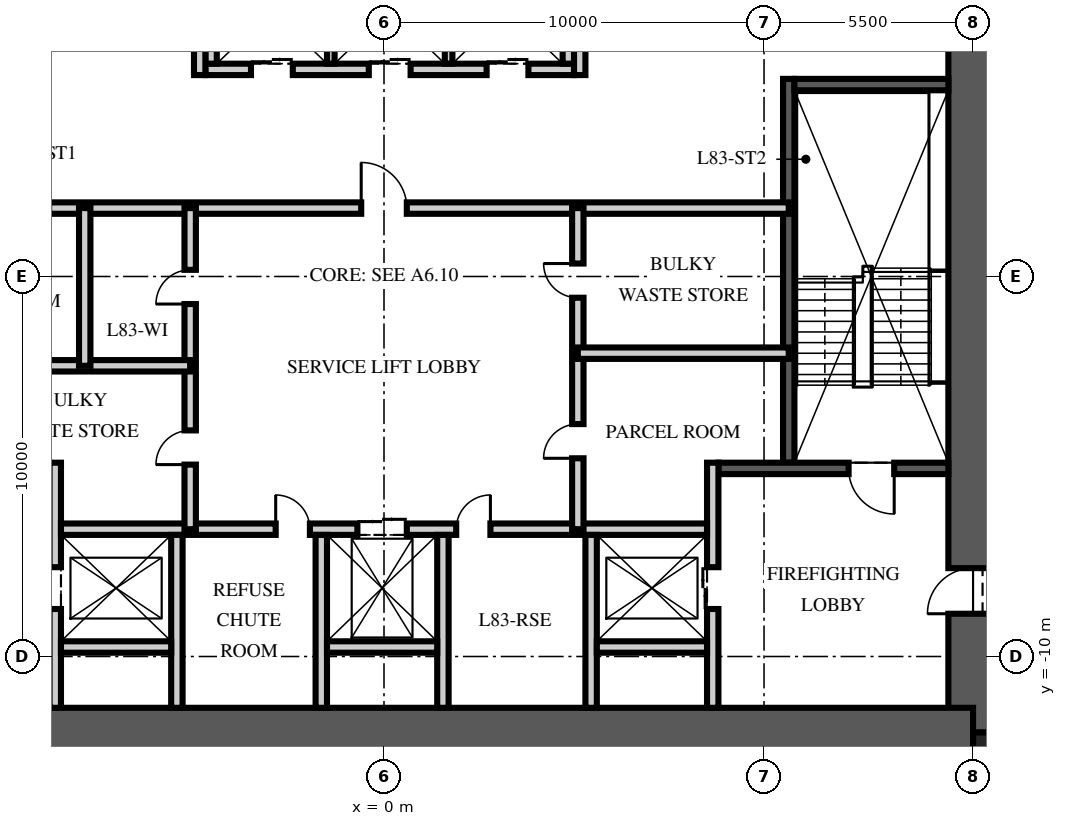
"""IFC4 building model, lengths in metres.
Left out: names, types, materials, properties, quantities, classifications, styles, units other than length and angle.
Written with IfcOpenShell. Run it as: python <this file> out.ifc"""

import sys

from ifc_helpers import new_model, si_unit, direction, frame, frame_2d, origin, origin_2d, place, context, subcontext, project, spatial, rectangle, extrude, element, fill, save


model = new_model("IFC4")
c1 = context("Model", 3, precision=1e-05, world=origin(), true_north=direction((0.0, 1.0)))
c2 = subcontext(c1, "Body", "Model", "MODEL_VIEW")
j1 = project(units=[si_unit("LENGTHUNIT", "METRE"), si_unit("PLANEANGLEUNIT", "RADIAN")], contexts=[c1])
p1 = place(None, origin())
s1 = spatial("IfcSite", under=j1, at=p1, CompositionType="ELEMENT")
p2 = place(p1, origin())
s2 = spatial("IfcBuilding", under=s1, at=p2, CompositionType="ELEMENT")
p3 = place(p2, frame((0.0, 0.0, 330.75)))
s3 = spatial("IfcBuildingStorey", under=s2, at=p3, CompositionType="ELEMENT", Elevation=330.75)
p4 = place(p3, frame((15.5, -12.0, -0.25), z_axis=(0.0, 0.0, 1.0), x_axis=(0.0, 1.0, 0.0)))
e1 = element("IfcWall", 1, at=p4, inside=s3, PredefinedType="SHEAR", context=c2, shape_type="SweptSolid", body=[
    extrude(rectangle(XDim=24.0, YDim=1.3, at=frame_2d((12.0, 0.0))), origin(), (0.0, 0.0, 1.0), 3.75),
])
p5 = place(p4, frame((3.125, 0.0, 0.25)))
e2 = element("IfcOpeningElement", 2, at=p5, cuts=e1, PredefinedType="OPENING", context=c2, shape_type="SweptSolid", body=[
    extrude(rectangle(XDim=1.2, YDim=2.1, at=frame_2d((0.6, 1.05))), frame((0.0, 0.66, 0.0), z_axis=(0.0, -1.0, 0.0), x_axis=(1.0, 0.0, 0.0)), (0.0, 0.0, 1.0), 1.32),
])
p6 = place(p4, frame((19.375, 0.0, 0.25)))
e3 = element("IfcOpeningElement", 3, at=p6, cuts=e1, PredefinedType="OPENING", context=c2, shape_type="SweptSolid", body=[
    extrude(rectangle(XDim=1.8, YDim=2.1, at=frame_2d((0.9, 1.05))), frame((0.0, 0.66, 0.0), z_axis=(0.0, -1.0, 0.0), x_axis=(1.0, 0.0, 0.0)), (0.0, 0.0, 1.0), 1.32),
])
p7 = place(p3, frame((-15.5, -12.0, -0.25), z_axis=(0.0, 0.0, 1.0), x_axis=(1.0, 0.0, 0.0)))
e4 = element("IfcWall", 4, at=p7, inside=s3, PredefinedType="SHEAR", context=c2, shape_type="SweptSolid", body=[
    extrude(rectangle(XDim=31.0, YDim=1.3, at=frame_2d((15.5, 0.0))), origin(), (0.0, 0.0, 1.0), 3.75),
])
p8 = place(p3, frame((15.825, -12.325, -0.25), z_axis=(0.0, 0.0, 1.0), x_axis=(1.0, 0.0, 0.0)))
e5 = element("IfcColumn", 5, at=p8, inside=s3, PredefinedType="COLUMN", context=c2, shape_type="SweptSolid", body=[
    extrude(rectangle(XDim=0.65, YDim=0.65, at=origin_2d()), origin(), (0.0, 0.0, 1.0), 3.75),
])
p9 = place(p3, frame((-8.65, -11.35, 0.0), z_axis=(0.0, 0.0, 1.0), x_axis=(0.0, 1.0, 0.0)))
e6 = element("IfcWall", 6, at=p9, inside=s3, PredefinedType="PARTITIONING", context=c2, shape_type="SweptSolid", body=[
    extrude(rectangle(XDim=6.45, YDim=0.3, at=frame_2d((3.225, 0.0))), origin(), (0.0, 0.0, 1.0), 3.5),
])
p10 = place(p9, frame((2.6, 0.0, 0.0)))
e7 = element("IfcOpeningElement", 7, at=p10, cuts=e6, PredefinedType="OPENING", context=c2, shape_type="SweptSolid", body=[
    extrude(rectangle(XDim=1.1, YDim=2.1, at=frame_2d((0.55, 1.05))), frame((0.0, 0.16, 0.0), z_axis=(0.0, -1.0, 0.0), x_axis=(1.0, 0.0, 0.0)), (0.0, 0.0, 1.0), 0.32),
])
p11 = place(p3, frame((10.65, -4.9, 0.0), z_axis=(0.0, 0.0, 1.0), x_axis=(0.0, 1.0, 0.0)))
e8 = element("IfcWall", 8, at=p11, inside=s3, PredefinedType="SOLIDWALL", context=c2, shape_type="SweptSolid", body=[
    extrude(rectangle(XDim=10.1, YDim=0.3, at=frame_2d((5.05, 0.0))), origin(), (0.0, 0.0, 1.0), 3.5),
])
p12 = place(p3, frame((14.85, -5.05, 0.0), z_axis=(0.0, 0.0, 1.0), x_axis=(-1.0, 0.0, 0.0)))
e9 = element("IfcWall", 9, at=p12, inside=s3, PredefinedType="SOLIDWALL", context=c2, shape_type="SweptSolid", body=[
    extrude(rectangle(XDim=6.05, YDim=0.3, at=frame_2d((3.025, 0.0))), origin(), (0.0, 0.0, 1.0), 3.5),
])
p13 = place(p12, frame((1.425, 0.0, 0.0)))
e10 = element("IfcOpeningElement", 10, at=p13, cuts=e9, PredefinedType="OPENING", context=c2, shape_type="SweptSolid", body=[
    extrude(rectangle(XDim=1.2, YDim=2.1, at=frame_2d((0.6, 1.05))), frame((0.0, 0.16, 0.0), z_axis=(0.0, -1.0, 0.0), x_axis=(1.0, 0.0, 0.0)), (0.0, 0.0, 1.0), 0.32),
])
p14 = place(p3, frame((14.85, 5.05, 0.0), z_axis=(0.0, 0.0, 1.0), x_axis=(-1.0, 0.0, 0.0)))
e11 = element("IfcWall", 11, at=p14, inside=s3, PredefinedType="SOLIDWALL", context=c2, shape_type="SweptSolid", body=[
    extrude(rectangle(XDim=4.05, YDim=0.3, at=frame_2d((2.025, 0.0))), origin(), (0.0, 0.0, 1.0), 3.5),
])
p15 = place(p3, frame((8.65, -11.35, 0.0), z_axis=(0.0, 0.0, 1.0), x_axis=(0.0, 1.0, 0.0)))
e12 = element("IfcWall", 12, at=p15, inside=s3, PredefinedType="PARTITIONING", context=c2, shape_type="SweptSolid", body=[
    extrude(rectangle(XDim=6.45, YDim=0.3, at=frame_2d((3.225, 0.0))), origin(), (0.0, 0.0, 1.0), 3.5),
])
p16 = place(p15, frame((2.6, 0.0, 0.0)))
e13 = element("IfcOpeningElement", 13, at=p16, cuts=e12, PredefinedType="OPENING", context=c2, shape_type="SweptSolid", body=[
    extrude(rectangle(XDim=1.1, YDim=2.1, at=frame_2d((0.55, 1.05))), frame((0.0, 0.16, 0.0), z_axis=(0.0, -1.0, 0.0), x_axis=(1.0, 0.0, 0.0)), (0.0, 0.0, 1.0), 0.32),
])
p17 = place(p3, frame((-8.5, -6.65, 0.0), z_axis=(0.0, 0.0, 1.0), x_axis=(1.0, 0.0, 0.0)))
e14 = element("IfcWall", 14, at=p17, inside=s3, PredefinedType="PARTITIONING", context=c2, shape_type="SweptSolid", body=[
    extrude(rectangle(XDim=17.0, YDim=0.3, at=frame_2d((8.5, 0.0))), origin(), (0.0, 0.0, 1.0), 3.5),
])
p18 = place(p17, frame((7.8, 0.0, 0.0)))
e15 = element("IfcOpeningElement", 15, at=p18, cuts=e14, PredefinedType="OPENING", context=c2, shape_type="SweptSolid", body=[
    extrude(rectangle(XDim=1.3, YDim=2.4, at=frame_2d((0.65, 1.2))), frame((0.0, 0.16, 0.0), z_axis=(0.0, -1.0, 0.0), x_axis=(1.0, 0.0, 0.0)), (0.0, 0.0, 1.0), 0.32),
])
p19 = place(p17, frame((5.65, 0.0, 0.0)))
e16 = element("IfcOpeningElement", 16, at=p19, cuts=e14, PredefinedType="OPENING", context=c2, shape_type="SweptSolid", body=[
    extrude(rectangle(XDim=0.9, YDim=2.1, at=frame_2d((0.45, 1.05))), frame((0.0, 0.16, 0.0), z_axis=(0.0, -1.0, 0.0), x_axis=(1.0, 0.0, 0.0)), (0.0, 0.0, 1.0), 0.32),
])
p20 = place(p17, frame((10.4, 0.0, 0.0)))
e17 = element("IfcOpeningElement", 17, at=p20, cuts=e14, PredefinedType="OPENING", context=c2, shape_type="SweptSolid", body=[
    extrude(rectangle(XDim=0.9, YDim=2.1, at=frame_2d((0.45, 1.05))), frame((0.0, 0.16, 0.0), z_axis=(0.0, -1.0, 0.0), x_axis=(1.0, 0.0, 0.0)), (0.0, 0.0, 1.0), 0.32),
])
for number, where, z_axis, x_axis in (
    (18, (-5.45, -11.35, 0.0), (0.0, 0.0, 1.0), (0.0, 1.0, 0.0)),
    (19, (-1.65, -11.35, 0.0), (0.0, 0.0, 1.0), (0.0, 1.0, 0.0)),
    (20, (1.55, -11.35, 0.0), (0.0, 0.0, 1.0), (0.0, 1.0, 0.0)),
    (21, (5.45, -11.35, 0.0), (0.0, 0.0, 1.0), (0.0, 1.0, 0.0)),
):
    element("IfcWall", number, at=place(p3, frame(where, z_axis=z_axis, x_axis=x_axis)), inside=s3, PredefinedType="PARTITIONING", context=c2, shape_type="SweptSolid", body=[
        extrude(rectangle(XDim=4.55, YDim=0.3, at=frame_2d((2.275, 0.0))), origin(), (0.0, 0.0, 1.0), 3.5),
    ])
for number, where, z_axis, x_axis in (
    (22, (-8.5, -9.75, 0.0), (0.0, 0.0, 1.0), (1.0, 0.0, 0.0)),
    (23, (-1.5, -9.75, 0.0), (0.0, 0.0, 1.0), (1.0, 0.0, 0.0)),
    (24, (5.6, -9.75, 0.0), (0.0, 0.0, 1.0), (1.0, 0.0, 0.0)),
):
    element("IfcWall", number, at=place(p3, frame(where, z_axis=z_axis, x_axis=x_axis)), inside=s3, PredefinedType="PARTITIONING", context=c2, shape_type="SweptSolid", body=[
        extrude(rectangle(XDim=2.9, YDim=0.3, at=frame_2d((1.45, 0.0))), origin(), (0.0, 0.0, 1.0), 3.5),
    ])
p21 = place(p3, frame((-4.7, 5.45, 0.0), z_axis=(0.0, 0.0, 1.0), x_axis=(1.0, 0.0, 0.0)))
e25 = element("IfcWall", 25, at=p21, inside=s3, PredefinedType="PARTITIONING", context=c2, shape_type="SweptSolid", body=[
    extrude(rectangle(XDim=9.7, YDim=0.3, at=frame_2d((4.85, 0.0))), origin(), (0.0, 0.0, 1.0), 3.5),
])
p22 = place(p21, frame((1.2, 0.0, 0.0)))
e26 = element("IfcOpeningElement", 26, at=p22, cuts=e25, PredefinedType="OPENING", context=c2, shape_type="SweptSolid", body=[
    extrude(rectangle(XDim=1.1, YDim=2.1, at=frame_2d((0.55, 1.05))), frame((0.0, 0.16, 0.0), z_axis=(0.0, -1.0, 0.0), x_axis=(1.0, 0.0, 0.0)), (0.0, 0.0, 1.0), 0.32),
])
p23 = place(p21, frame((4.3, 0.0, 0.0)))
e27 = element("IfcOpeningElement", 27, at=p23, cuts=e25, PredefinedType="OPENING", context=c2, shape_type="SweptSolid", body=[
    extrude(rectangle(XDim=1.1, YDim=2.1, at=frame_2d((0.55, 1.05))), frame((0.0, 0.16, 0.0), z_axis=(0.0, -1.0, 0.0), x_axis=(1.0, 0.0, 0.0)), (0.0, 0.0, 1.0), 0.32),
])
p24 = place(p21, frame((7.4, 0.0, 0.0)))
e28 = element("IfcOpeningElement", 28, at=p24, cuts=e25, PredefinedType="OPENING", context=c2, shape_type="SweptSolid", body=[
    extrude(rectangle(XDim=1.1, YDim=2.1, at=frame_2d((0.55, 1.05))), frame((0.0, 0.16, 0.0), z_axis=(0.0, -1.0, 0.0), x_axis=(1.0, 0.0, 0.0)), (0.0, 0.0, 1.0), 0.32),
])
for number, where, z_axis, x_axis in (
    (29, (-4.55, 5.6, 0.0), (0.0, 0.0, 1.0), (0.0, 1.0, 0.0)),
    (30, (4.85, 5.6, 0.0), (0.0, 0.0, 1.0), (0.0, 1.0, 0.0)),
):
    element("IfcWall", number, at=place(p3, frame(where, z_axis=z_axis, x_axis=x_axis)), inside=s3, PredefinedType="PARTITIONING", context=c2, shape_type="SweptSolid", body=[
        extrude(rectangle(XDim=2.8, YDim=0.3, at=frame_2d((1.4, 0.0))), origin(), (0.0, 0.0, 1.0), 3.5),
    ])
for number, where, z_axis, x_axis in (
    (31, (-1.4, 5.6, 0.0), (0.0, 0.0, 1.0), (0.0, 1.0, 0.0)),
    (32, (1.7, 5.6, 0.0), (0.0, 0.0, 1.0), (0.0, 1.0, 0.0)),
):
    element("IfcWall", number, at=place(p3, frame(where, z_axis=z_axis, x_axis=x_axis)), inside=s3, PredefinedType="PARTITIONING", context=c2, shape_type="SweptSolid", body=[
        extrude(rectangle(XDim=2.8, YDim=0.2, at=frame_2d((1.4, 0.0))), origin(), (0.0, 0.0, 1.0), 3.5),
    ])
p25 = place(p3, frame((-10.65, 1.8, 0.0), z_axis=(0.0, 0.0, 1.0), x_axis=(1.0, 0.0, 0.0)))
e33 = element("IfcWall", 33, at=p25, inside=s3, PredefinedType="PARTITIONING", context=c2, shape_type="SweptSolid", body=[
    extrude(rectangle(XDim=21.3, YDim=0.3, at=frame_2d((10.65, 0.0))), origin(), (0.0, 0.0, 1.0), 3.5),
])
p26 = place(p25, frame((10.05, 0.0, 0.0)))
e34 = element("IfcOpeningElement", 34, at=p26, cuts=e33, PredefinedType="OPENING", context=c2, shape_type="SweptSolid", body=[
    extrude(rectangle(XDim=1.2, YDim=2.1, at=frame_2d((0.6, 1.05))), frame((0.0, 0.16, 0.0), z_axis=(0.0, -1.0, 0.0), x_axis=(1.0, 0.0, 0.0)), (0.0, 0.0, 1.0), 0.32),
])
p27 = place(p25, frame((0.938, 0.0, 0.0)))
e35 = element("IfcOpeningElement", 35, at=p27, cuts=e33, PredefinedType="OPENING", context=c2, shape_type="SweptSolid", body=[
    extrude(rectangle(XDim=0.9, YDim=2.1, at=frame_2d((0.45, 1.05))), frame((0.0, 0.16, 0.0), z_axis=(0.0, -1.0, 0.0), x_axis=(1.0, 0.0, 0.0)), (0.0, 0.0, 1.0), 0.32),
])
p28 = place(p3, frame((-5.1, -6.65, 0.0), z_axis=(0.0, 0.0, 1.0), x_axis=(0.0, 1.0, 0.0)))
e36 = element("IfcWall", 36, at=p28, inside=s3, PredefinedType="PARTITIONING", context=c2, shape_type="SweptSolid", body=[
    extrude(rectangle(XDim=8.45, YDim=0.3, at=frame_2d((4.225, 0.0))), origin(), (0.0, 0.0, 1.0), 3.5),
])
p29 = place(p28, frame((1.7, 0.0, 0.0)))
e37 = element("IfcOpeningElement", 37, at=p29, cuts=e36, PredefinedType="OPENING", context=c2, shape_type="SweptSolid", body=[
    extrude(rectangle(XDim=0.9, YDim=2.1, at=frame_2d((0.45, 1.05))), frame((0.0, 0.16, 0.0), z_axis=(0.0, -1.0, 0.0), x_axis=(1.0, 0.0, 0.0)), (0.0, 0.0, 1.0), 0.32),
])
p30 = place(p28, frame((5.925, 0.0, 0.0)))
e38 = element("IfcOpeningElement", 38, at=p30, cuts=e36, PredefinedType="OPENING", context=c2, shape_type="SweptSolid", body=[
    extrude(rectangle(XDim=0.9, YDim=2.1, at=frame_2d((0.45, 1.05))), frame((0.0, 0.16, 0.0), z_axis=(0.0, -1.0, 0.0), x_axis=(1.0, 0.0, 0.0)), (0.0, 0.0, 1.0), 0.32),
])
p31 = place(p3, frame((5.1, -6.65, 0.0), z_axis=(0.0, 0.0, 1.0), x_axis=(0.0, 1.0, 0.0)))
e39 = element("IfcWall", 39, at=p31, inside=s3, PredefinedType="PARTITIONING", context=c2, shape_type="SweptSolid", body=[
    extrude(rectangle(XDim=8.45, YDim=0.3, at=frame_2d((4.225, 0.0))), origin(), (0.0, 0.0, 1.0), 3.5),
])
p32 = place(p31, frame((1.866, 0.0, 0.0)))
e40 = element("IfcOpeningElement", 40, at=p32, cuts=e39, PredefinedType="OPENING", context=c2, shape_type="SweptSolid", body=[
    extrude(rectangle(XDim=0.9, YDim=2.1, at=frame_2d((0.45, 1.05))), frame((0.0, 0.16, 0.0), z_axis=(0.0, -1.0, 0.0), x_axis=(1.0, 0.0, 0.0)), (0.0, 0.0, 1.0), 0.32),
])
p33 = place(p31, frame((6.091, 0.0, 0.0)))
e41 = element("IfcOpeningElement", 41, at=p33, cuts=e39, PredefinedType="OPENING", context=c2, shape_type="SweptSolid", body=[
    extrude(rectangle(XDim=0.9, YDim=2.1, at=frame_2d((0.45, 1.05))), frame((0.0, 0.16, 0.0), z_axis=(0.0, -1.0, 0.0), x_axis=(1.0, 0.0, 0.0)), (0.0, 0.0, 1.0), 0.32),
])
p34 = place(p3, frame((-10.65, -2.35, 0.0), z_axis=(0.0, 0.0, 1.0), x_axis=(1.0, 0.0, 0.0)))
e42 = element("IfcWall", 42, at=p34, inside=s3, PredefinedType="PARTITIONING", context=c2, shape_type="SweptSolid", body=[
    extrude(rectangle(XDim=5.55, YDim=0.3, at=frame_2d((2.775, 0.0))), origin(), (0.0, 0.0, 1.0), 3.5),
])
p35 = place(p3, frame((-7.875, -2.35, 0.0), z_axis=(0.0, 0.0, 1.0), x_axis=(0.0, 1.0, 0.0)))
e43 = element("IfcWall", 43, at=p35, inside=s3, PredefinedType="PARTITIONING", context=c2, shape_type="SweptSolid", body=[
    extrude(rectangle(XDim=4.15, YDim=0.3, at=frame_2d((2.075, 0.0))), origin(), (0.0, 0.0, 1.0), 3.5),
])
p36 = place(p3, frame((10.65, -2.018, 0.0), z_axis=(0.0, 0.0, 1.0), x_axis=(-1.0, 0.0, 0.0)))
e44 = element("IfcWall", 44, at=p36, inside=s3, PredefinedType="PARTITIONING", context=c2, shape_type="SweptSolid", body=[
    extrude(rectangle(XDim=5.55, YDim=0.3, at=frame_2d((2.775, 0.0))), origin(), (0.0, 0.0, 1.0), 3.5),
])
p37 = place(p3, frame((-4.85, 5.3, 0.0), z_axis=(0.0, 0.0, 1.0), x_axis=(0.0, 1.0, 0.0)))
e45 = element("IfcWall", 45, at=p37, inside=s3, PredefinedType="PARTITIONING", context=c2, shape_type="SweptSolid", body=[
    extrude(rectangle(XDim=6.05, YDim=0.3, at=frame_2d((3.025, 0.0))), origin(), (0.0, 0.0, 1.0), 3.5),
])
p38 = place(p3, frame((5.15, 5.3, 0.0), z_axis=(0.0, 0.0, 1.0), x_axis=(0.0, 1.0, 0.0)))
e46 = element("IfcWall", 46, at=p38, inside=s3, PredefinedType="PARTITIONING", context=c2, shape_type="SweptSolid", body=[
    extrude(rectangle(XDim=6.05, YDim=0.3, at=frame_2d((3.025, 0.0))), origin(), (0.0, 0.0, 1.0), 3.5),
])
p39 = place(p38, frame((4.225, 0.0, 0.0)))
e47 = element("IfcOpeningElement", 47, at=p39, cuts=e46, PredefinedType="OPENING", context=c2, shape_type="SweptSolid", body=[
    extrude(rectangle(XDim=0.9, YDim=2.1, at=frame_2d((0.45, 1.05))), frame((0.0, 0.16, 0.0), z_axis=(0.0, -1.0, 0.0), x_axis=(1.0, 0.0, 0.0)), (0.0, 0.0, 1.0), 0.32),
])
p40 = place(p13, origin())
e48 = element("IfcDoor", 48, at=p40, inside=s3, OperationType="SINGLE_SWING_LEFT", PredefinedType="DOOR", context=c2, shape_type="SweptSolid", body=[
    extrude(rectangle(XDim=1.2, YDim=2.1, at=frame_2d((0.6, 1.05))), frame((0.0, 0.025, 0.0), z_axis=(0.0, -1.0, 0.0), x_axis=(1.0, 0.0, 0.0)), (0.0, 0.0, 1.0), 0.05),
])
fill(e10, e48)
p41 = place(p5, origin())
e49 = element("IfcDoor", 49, at=p41, inside=s3, OperationType="SINGLE_SWING_LEFT", PredefinedType="DOOR", context=c2, shape_type="SweptSolid", body=[
    extrude(rectangle(XDim=1.2, YDim=2.1, at=frame_2d((0.6, 1.05))), frame((0.0, 0.025, 0.0), z_axis=(0.0, -1.0, 0.0), x_axis=(1.0, 0.0, 0.0)), (0.0, 0.0, 1.0), 0.05),
])
fill(e2, e49)
p42 = place(p10, origin())
e50 = element("IfcDoor", 50, at=p42, inside=s3, OperationType="DOUBLE_DOOR_SLIDING", PredefinedType="DOOR", context=c2, shape_type="SweptSolid", body=[
    extrude(rectangle(XDim=1.1, YDim=2.1, at=frame_2d((0.55, 1.05))), frame((0.0, 0.025, 0.0), z_axis=(0.0, -1.0, 0.0), x_axis=(1.0, 0.0, 0.0)), (0.0, 0.0, 1.0), 0.05),
])
fill(e7, e50)
p43 = place(p16, origin())
e51 = element("IfcDoor", 51, at=p43, inside=s3, OperationType="DOUBLE_DOOR_SLIDING", PredefinedType="DOOR", context=c2, shape_type="SweptSolid", body=[
    extrude(rectangle(XDim=1.1, YDim=2.1, at=frame_2d((0.55, 1.05))), frame((0.0, 0.025, 0.0), z_axis=(0.0, -1.0, 0.0), x_axis=(1.0, 0.0, 0.0)), (0.0, 0.0, 1.0), 0.05),
])
fill(e13, e51)
p44 = place(p22, origin())
e52 = element("IfcDoor", 52, at=p44, inside=s3, OperationType="DOUBLE_DOOR_SLIDING", PredefinedType="DOOR", context=c2, shape_type="SweptSolid", body=[
    extrude(rectangle(XDim=1.1, YDim=2.1, at=frame_2d((0.55, 1.05))), frame((0.0, 0.025, 0.0), z_axis=(0.0, -1.0, 0.0), x_axis=(1.0, 0.0, 0.0)), (0.0, 0.0, 1.0), 0.05),
])
fill(e26, e52)
p45 = place(p23, origin())
e53 = element("IfcDoor", 53, at=p45, inside=s3, OperationType="DOUBLE_DOOR_SLIDING", PredefinedType="DOOR", context=c2, shape_type="SweptSolid", body=[
    extrude(rectangle(XDim=1.1, YDim=2.1, at=frame_2d((0.55, 1.05))), frame((0.0, 0.025, 0.0), z_axis=(0.0, -1.0, 0.0), x_axis=(1.0, 0.0, 0.0)), (0.0, 0.0, 1.0), 0.05),
])
fill(e27, e53)
p46 = place(p24, origin())
e54 = element("IfcDoor", 54, at=p46, inside=s3, OperationType="DOUBLE_DOOR_SLIDING", PredefinedType="DOOR", context=c2, shape_type="SweptSolid", body=[
    extrude(rectangle(XDim=1.1, YDim=2.1, at=frame_2d((0.55, 1.05))), frame((0.0, 0.025, 0.0), z_axis=(0.0, -1.0, 0.0), x_axis=(1.0, 0.0, 0.0)), (0.0, 0.0, 1.0), 0.05),
])
fill(e28, e54)
p47 = place(p18, origin())
e55 = element("IfcDoor", 55, at=p47, inside=s3, OperationType="DOUBLE_DOOR_SLIDING", PredefinedType="DOOR", context=c2, shape_type="SweptSolid", body=[
    extrude(rectangle(XDim=1.3, YDim=2.4, at=frame_2d((0.65, 1.2))), frame((0.0, 0.025, 0.0), z_axis=(0.0, -1.0, 0.0), x_axis=(1.0, 0.0, 0.0)), (0.0, 0.0, 1.0), 0.05),
])
fill(e15, e55)
p48 = place(p26, origin())
e56 = element("IfcDoor", 56, at=p48, inside=s3, OperationType="SINGLE_SWING_LEFT", PredefinedType="DOOR", context=c2, shape_type="SweptSolid", body=[
    extrude(rectangle(XDim=1.2, YDim=2.1, at=frame_2d((0.6, 1.05))), frame((0.0, 0.025, 0.0), z_axis=(0.0, -1.0, 0.0), x_axis=(1.0, 0.0, 0.0)), (0.0, 0.0, 1.0), 0.05),
])
fill(e34, e56)
p49 = place(p19, origin())
e57 = element("IfcDoor", 57, at=p49, inside=s3, OperationType="SINGLE_SWING_LEFT", PredefinedType="DOOR", context=c2, shape_type="SweptSolid", body=[
    extrude(rectangle(XDim=0.9, YDim=2.1, at=frame_2d((0.45, 1.05))), frame((0.0, 0.025, 0.0), z_axis=(0.0, -1.0, 0.0), x_axis=(1.0, 0.0, 0.0)), (0.0, 0.0, 1.0), 0.05),
])
fill(e16, e57)
p50 = place(p20, origin())
e58 = element("IfcDoor", 58, at=p50, inside=s3, OperationType="SINGLE_SWING_RIGHT", PredefinedType="DOOR", context=c2, shape_type="SweptSolid", body=[
    extrude(rectangle(XDim=0.9, YDim=2.1, at=frame_2d((0.45, 1.05))), frame((0.0, 0.025, 0.0), z_axis=(0.0, -1.0, 0.0), x_axis=(1.0, 0.0, 0.0)), (0.0, 0.0, 1.0), 0.05),
])
fill(e17, e58)
p51 = place(p29, origin())
e59 = element("IfcDoor", 59, at=p51, inside=s3, OperationType="SINGLE_SWING_LEFT", PredefinedType="DOOR", context=c2, shape_type="SweptSolid", body=[
    extrude(rectangle(XDim=0.9, YDim=2.1, at=frame_2d((0.45, 1.05))), frame((0.0, 0.025, 0.0), z_axis=(0.0, -1.0, 0.0), x_axis=(1.0, 0.0, 0.0)), (0.0, 0.0, 1.0), 0.05),
])
fill(e37, e59)
p52 = place(p30, origin())
e60 = element("IfcDoor", 60, at=p52, inside=s3, OperationType="SINGLE_SWING_LEFT", PredefinedType="DOOR", context=c2, shape_type="SweptSolid", body=[
    extrude(rectangle(XDim=0.9, YDim=2.1, at=frame_2d((0.45, 1.05))), frame((0.0, 0.025, 0.0), z_axis=(0.0, -1.0, 0.0), x_axis=(1.0, 0.0, 0.0)), (0.0, 0.0, 1.0), 0.05),
])
fill(e38, e60)
p53 = place(p32, origin())
e61 = element("IfcDoor", 61, at=p53, inside=s3, OperationType="SINGLE_SWING_LEFT", PredefinedType="DOOR", context=c2, shape_type="SweptSolid", body=[
    extrude(rectangle(XDim=0.9, YDim=2.1, at=frame_2d((0.45, 1.05))), frame((0.0, 0.025, 0.0), z_axis=(0.0, -1.0, 0.0), x_axis=(1.0, 0.0, 0.0)), (0.0, 0.0, 1.0), 0.05),
])
fill(e40, e61)
p54 = place(p33, origin())
e62 = element("IfcDoor", 62, at=p54, inside=s3, OperationType="SINGLE_SWING_RIGHT", PredefinedType="DOOR", context=c2, shape_type="SweptSolid", body=[
    extrude(rectangle(XDim=0.9, YDim=2.1, at=frame_2d((0.45, 1.05))), frame((0.0, 0.025, 0.0), z_axis=(0.0, -1.0, 0.0), x_axis=(1.0, 0.0, 0.0)), (0.0, 0.0, 1.0), 0.05),
])
fill(e41, e62)
save(model, sys.argv[1])
